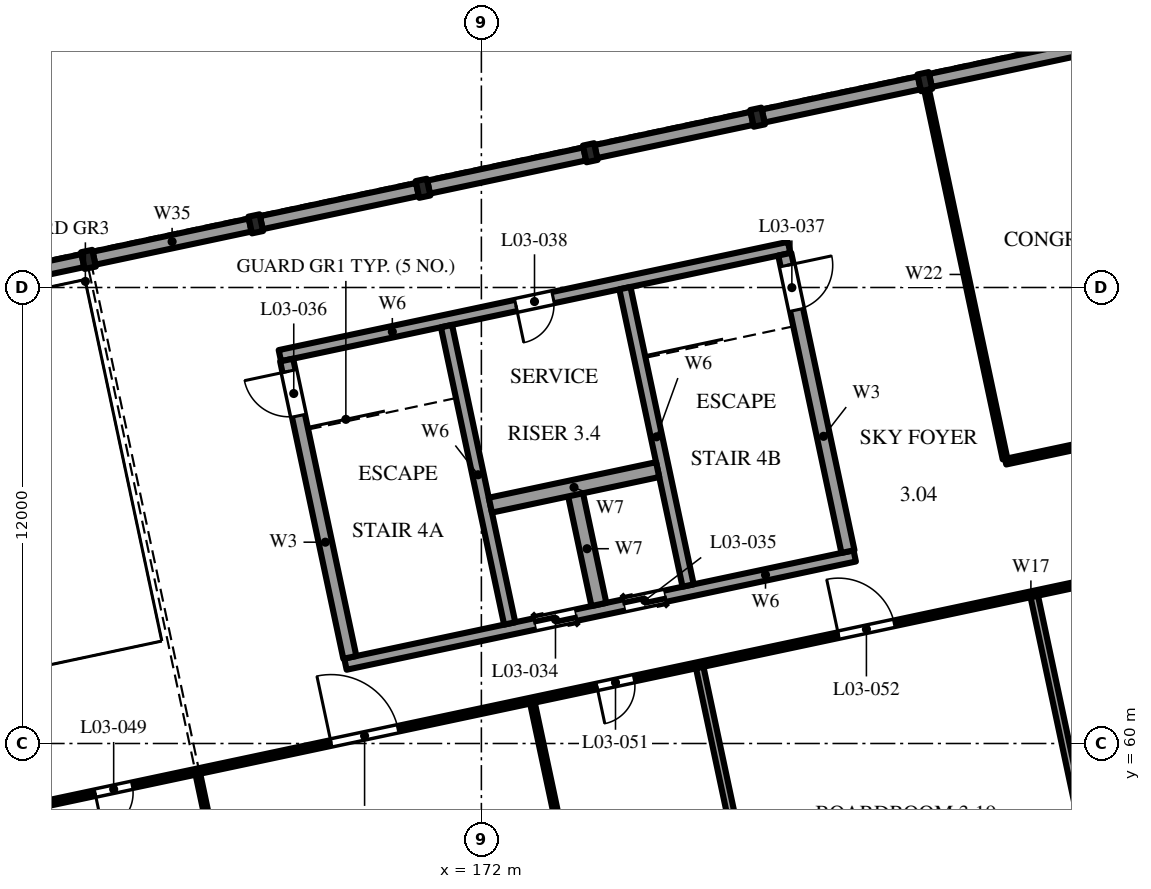
"""IFC4 building model, lengths in metres.
Left out: names, types, materials, properties, quantities, classifications, styles, units other than length and angle.
Written with IfcOpenShell. Run it as: python <this file> out.ifc"""

import sys

from ifc_helpers import new_model, si_unit, direction, frame, frame_2d, origin, origin_2d, place, context, subcontext, project, spatial, polyline, rectangle, i_section, outline, extrude, element, fill, save


model = new_model("IFC4")
c1 = context("Model", 3, precision=1e-05, world=origin(), true_north=direction((0.0, 1.0)))
c2 = subcontext(c1, "Body", "Model", "MODEL_VIEW")
j1 = project(units=[si_unit("LENGTHUNIT", "METRE"), si_unit("PLANEANGLEUNIT", "RADIAN")], contexts=[c1])
p1 = place(None, origin())
s1 = spatial("IfcSite", under=j1, at=p1, CompositionType="ELEMENT")
p2 = place(p1, origin())
s2 = spatial("IfcBuilding", under=s1, at=p2, CompositionType="ELEMENT")
p3 = place(p2, frame((0.0, 0.0, 16.8)))
s3 = spatial("IfcBuildingStorey", under=s2, at=p3, CompositionType="ELEMENT", Elevation=16.8)
for number, where, z_axis, x_axis in (
    (1, (161.661, 72.739, 0.0), (0.0, 0.0, 1.0), (0.978, 0.208, 0.0)),
    (2, (166.063, 73.675, 0.0), (0.0, 0.0, 1.0), (0.978, 0.208, 0.0)),
    (3, (170.464, 74.61, 0.0), (0.0, 0.0, 1.0), (0.978, 0.208, 0.0)),
    (4, (174.866, 75.546, 0.0), (0.0, 0.0, 1.0), (0.978, 0.208, 0.0)),
    (5, (179.268, 76.482, 0.0), (0.0, 0.0, 1.0), (0.978, 0.208, 0.0)),
    (6, (183.669, 77.417, 0.0), (0.0, 0.0, 1.0), (0.978, 0.208, 0.0)),
):
    element("IfcColumn", number, at=place(p3, frame(where, z_axis=z_axis, x_axis=x_axis)), inside=s3, PredefinedType="COLUMN", context=c2, shape_type="SweptSolid", body=[
        extrude(i_section(OverallWidth=0.3, OverallDepth=0.45, WebThickness=0.014, FlangeThickness=0.026, FilletRadius=0.027, at=origin_2d()), origin(), (0.0, 0.0, 1.0), 4.8),
    ])
p4 = place(p3, frame((166.698, 70.206, 0.0), z_axis=(0.0, 0.0, 1.0), x_axis=(0.978147662755, 0.20791139903, 0.0)))
e7 = element("IfcWall", 7, at=p4, inside=s3, PredefinedType="SHEAR", context=c2, shape_type="SweptSolid", body=[
    extrude(outline(polyline([(0.0, 0.0), (13.7, 0.0), (13.7, 12.494), (0.0, 11.761), (0.0, 0.0)])), frame((0.0, 0.15, 0.0), z_axis=(0.0, -1.0, 0.0), x_axis=(1.0, 0.0, 0.0)), (0.0, 0.0, 1.0), 0.3),
])
p5 = place(p4, frame((6.35, 0.0, 0.0)))
e8 = element("IfcOpeningElement", 8, at=p5, cuts=e7, PredefinedType="OPENING", context=c2, shape_type="SweptSolid", body=[
    extrude(rectangle(XDim=1.0, YDim=2.1, at=frame_2d((0.5, 1.05))), frame((0.0, 0.16, 0.0), z_axis=(0.0, -1.0, 0.0), x_axis=(1.0, 0.0, 0.0)), (0.0, 0.0, 1.0), 0.32),
])
p6 = place(p3, frame((168.423, 62.087, 0.0), z_axis=(0.0, 0.0, 1.0), x_axis=(0.978147662755, 0.20791139903, 0.0)))
e9 = element("IfcWall", 9, at=p6, inside=s3, PredefinedType="SHEAR", context=c2, shape_type="SweptSolid", body=[
    extrude(outline(polyline([(0.0, 0.0), (13.7, 0.0), (13.7, 12.929), (0.0, 12.196), (0.0, 0.0)])), frame((0.0, 0.15, 0.0), z_axis=(0.0, -1.0, 0.0), x_axis=(1.0, 0.0, 0.0)), (0.0, 0.0, 1.0), 0.3),
])
p7 = place(p6, frame((5.1, 0.0, 0.0)))
e10 = element("IfcOpeningElement", 10, at=p7, cuts=e9, PredefinedType="OPENING", context=c2, shape_type="SweptSolid", body=[
    extrude(rectangle(XDim=1.1, YDim=2.1, at=frame_2d((0.55, 1.05))), frame((0.0, 0.16, 0.0), z_axis=(0.0, -1.0, 0.0), x_axis=(1.0, 0.0, 0.0)), (0.0, 0.0, 1.0), 0.32),
])
p8 = place(p6, frame((7.5, 0.0, 0.0)))
e11 = element("IfcOpeningElement", 11, at=p8, cuts=e9, PredefinedType="OPENING", context=c2, shape_type="SweptSolid", body=[
    extrude(rectangle(XDim=1.1, YDim=2.1, at=frame_2d((0.55, 1.05))), frame((0.0, 0.16, 0.0), z_axis=(0.0, -1.0, 0.0), x_axis=(1.0, 0.0, 0.0)), (0.0, 0.0, 1.0), 0.32),
])
p9 = place(p3, frame((166.876, 70.091, 0.0), z_axis=(0.0, 0.0, 1.0), x_axis=(0.207915693476, -0.978146749934, 0.0)))
e12 = element("IfcWall", 12, at=p9, inside=s3, PredefinedType="SOLIDWALL", context=c2, shape_type="SweptSolid", body=[
    extrude(outline(polyline([(0.0, 0.0), (8.0, 0.0), (8.0, 12.196), (0.0, 11.777), (0.0, 0.0)])), frame((0.0, 0.175, 0.0), z_axis=(0.0, -1.0, 0.0), x_axis=(1.0, 0.0, 0.0)), (0.0, 0.0, 1.0), 0.35),
])
p10 = place(p9, frame((0.3, 0.0, 0.0)))
e13 = element("IfcOpeningElement", 13, at=p10, cuts=e12, PredefinedType="OPENING", context=c2, shape_type="SweptSolid", body=[
    extrude(rectangle(XDim=1.2, YDim=2.1, at=frame_2d((0.6, 1.05))), frame((0.0, 0.185, 0.0), z_axis=(0.0, -1.0, 0.0), x_axis=(1.0, 0.0, 0.0)), (0.0, 0.0, 1.0), 0.37),
])
p11 = place(p3, frame((179.983, 72.876, 0.0), z_axis=(0.0, 0.0, 1.0), x_axis=(0.207915693476, -0.978146749934, 0.0)))
e14 = element("IfcWall", 14, at=p11, inside=s3, PredefinedType="SOLIDWALL", context=c2, shape_type="SweptSolid", body=[
    extrude(outline(polyline([(0.0, 0.0), (8.0, 0.0), (8.0, 12.913), (0.0, 12.494), (0.0, 0.0)])), frame((0.0, 0.175, 0.0), z_axis=(0.0, -1.0, 0.0), x_axis=(1.0, 0.0, 0.0)), (0.0, 0.0, 1.0), 0.35),
])
p12 = place(p11, frame((0.3, 0.0, 0.0)))
e15 = element("IfcOpeningElement", 15, at=p12, cuts=e14, PredefinedType="OPENING", context=c2, shape_type="SweptSolid", body=[
    extrude(rectangle(XDim=1.2, YDim=2.1, at=frame_2d((0.6, 1.05))), frame((0.0, 0.185, 0.0), z_axis=(0.0, -1.0, 0.0), x_axis=(1.0, 0.0, 0.0)), (0.0, 0.0, 1.0), 0.37),
])
p13 = place(p3, frame((171.082, 70.985, 0.0), z_axis=(0.0, 0.0, 1.0), x_axis=(0.207915693476, -0.978146749934, 0.0)))
e16 = element("IfcWall", 16, at=p13, inside=s3, PredefinedType="SHEAR", context=c2, shape_type="SweptSolid", body=[
    extrude(outline(polyline([(0.0, 0.0), (8.0, 0.0), (8.0, 12.426), (0.0, 12.007), (0.0, 0.0)])), frame((0.0, 0.15, 0.0), z_axis=(0.0, -1.0, 0.0), x_axis=(1.0, 0.0, 0.0)), (0.0, 0.0, 1.0), 0.3),
])
p14 = place(p3, frame((175.777, 71.983, 0.0), z_axis=(0.0, 0.0, 1.0), x_axis=(0.207915693476, -0.978146749934, 0.0)))
e17 = element("IfcWall", 17, at=p14, inside=s3, PredefinedType="SHEAR", context=c2, shape_type="SweptSolid", body=[
    extrude(outline(polyline([(0.0, 0.0), (8.0, 0.0), (8.0, 12.683), (0.0, 12.264), (0.0, 0.0)])), frame((0.0, 0.15, 0.0), z_axis=(0.0, -1.0, 0.0), x_axis=(1.0, 0.0, 0.0)), (0.0, 0.0, 1.0), 0.3),
])
p15 = place(p3, frame((174.469, 66.593, 0.0), z_axis=(0.0, 0.0, 1.0), x_axis=(0.207933702079, -0.978142921837, 0.0)))
e18 = element("IfcWall", 18, at=p15, inside=s3, PredefinedType="SHEAR", context=c2, shape_type="SweptSolid", body=[
    extrude(outline(polyline([(0.0, 0.0), (3.0, 0.0), (3.0, 12.554), (0.0, 12.397), (0.0, 0.0)])), frame((0.0, 0.2, 0.0), z_axis=(0.0, -1.0, 0.0), x_axis=(1.0, 0.0, 0.0)), (0.0, 0.0, 1.0), 0.4),
])
p16 = place(p3, frame((172.237, 66.272, 0.0), z_axis=(0.0, 0.0, 1.0), x_axis=(0.978149611564, 0.20790223038, 0.0)))
e19 = element("IfcWall", 19, at=p16, inside=s3, PredefinedType="SHEAR", context=c2, shape_type="SweptSolid", body=[
    extrude(outline(polyline([(0.0, 0.0), (4.5, 0.0), (4.5, 12.51), (0.0, 12.269), (0.0, 0.0)])), frame((0.0, 0.2, 0.0), z_axis=(0.0, -1.0, 0.0), x_axis=(1.0, 0.0, 0.0)), (0.0, 0.0, 1.0), 0.4),
])
p17 = place(p3, frame((157.406, 71.835, 0.0), z_axis=(0.0, 0.0, 1.0), x_axis=(0.978146440129, 0.207917150959, 0.0)))
e20 = element("IfcWall", 20, at=p17, inside=s3, PredefinedType="SOLIDWALL", context=c2, shape_type="SweptSolid", body=[
    extrude(outline(polyline([(0.0, 0.0), (4.2, 0.0), (4.2, 12.633), (0.0, 12.408), (0.0, 0.0)])), frame((0.0, 0.175, 0.0), z_axis=(0.0, -1.0, 0.0), x_axis=(1.0, 0.0, 0.0)), (0.0, 0.0, 1.0), 0.35),
])
p18 = place(p3, frame((161.808, 72.771, 0.0), z_axis=(0.0, 0.0, 1.0), x_axis=(0.978155748334, 0.207873355681, 0.0)))
e21 = element("IfcWall", 21, at=p18, inside=s3, PredefinedType="SOLIDWALL", context=c2, shape_type="SweptSolid", body=[
    extrude(outline(polyline([(0.0, 0.0), (4.2, 0.0), (4.2, 12.874), (0.0, 12.649), (0.0, 0.0)])), frame((0.0, 0.175, 0.0), z_axis=(0.0, -1.0, 0.0), x_axis=(1.0, 0.0, 0.0)), (0.0, 0.0, 1.0), 0.35),
])
p19 = place(p3, frame((166.209, 73.706, 0.0), z_axis=(0.0, 0.0, 1.0), x_axis=(0.978143927149, 0.207928972925, 0.0)))
e22 = element("IfcWall", 22, at=p19, inside=s3, PredefinedType="SOLIDWALL", context=c2, shape_type="SweptSolid", body=[
    extrude(outline(polyline([(0.0, 0.0), (4.2, 0.0), (4.2, 13.114), (0.0, 12.889), (0.0, 0.0)])), frame((0.0, 0.175, 0.0), z_axis=(0.0, -1.0, 0.0), x_axis=(1.0, 0.0, 0.0)), (0.0, 0.0, 1.0), 0.35),
])
p20 = place(p3, frame((170.611, 74.642, 0.0), z_axis=(0.0, 0.0, 1.0), x_axis=(0.978143927149, 0.207928972925, 0.0)))
e23 = element("IfcWall", 23, at=p20, inside=s3, PredefinedType="SOLIDWALL", context=c2, shape_type="SweptSolid", body=[
    extrude(outline(polyline([(0.0, 0.0), (4.2, 0.0), (4.2, 13.355), (0.0, 13.13), (0.0, 0.0)])), frame((0.0, 0.175, 0.0), z_axis=(0.0, -1.0, 0.0), x_axis=(1.0, 0.0, 0.0)), (0.0, 0.0, 1.0), 0.35),
])
p21 = place(p3, frame((175.013, 75.577, 0.0), z_axis=(0.0, 0.0, 1.0), x_axis=(0.978146440129, 0.207917150959, 0.0)))
e24 = element("IfcWall", 24, at=p21, inside=s3, PredefinedType="SOLIDWALL", context=c2, shape_type="SweptSolid", body=[
    extrude(outline(polyline([(0.0, 0.0), (4.2, 0.0), (4.2, 13.596), (0.0, 13.371), (0.0, 0.0)])), frame((0.0, 0.175, 0.0), z_axis=(0.0, -1.0, 0.0), x_axis=(1.0, 0.0, 0.0)), (0.0, 0.0, 1.0), 0.35),
])
p22 = place(p3, frame((179.415, 76.513, 0.0), z_axis=(0.0, 0.0, 1.0), x_axis=(0.978155748334, 0.207873355681, 0.0)))
e25 = element("IfcWall", 25, at=p22, inside=s3, PredefinedType="SOLIDWALL", context=c2, shape_type="SweptSolid", body=[
    extrude(outline(polyline([(0.0, 0.0), (4.2, 0.0), (4.2, 13.836), (0.0, 13.612), (0.0, 0.0)])), frame((0.0, 0.175, 0.0), z_axis=(0.0, -1.0, 0.0), x_axis=(1.0, 0.0, 0.0)), (0.0, 0.0, 1.0), 0.35),
])
p23 = place(p3, frame((183.816, 77.448, 0.0), z_axis=(0.0, 0.0, 1.0), x_axis=(0.978143927149, 0.207928972925, 0.0)))
e26 = element("IfcWall", 26, at=p23, inside=s3, PredefinedType="SOLIDWALL", context=c2, shape_type="SweptSolid", body=[
    extrude(outline(polyline([(0.0, 0.0), (4.2, 0.0), (4.2, 14.077), (0.0, 13.853), (0.0, 0.0)])), frame((0.0, 0.175, 0.0), z_axis=(0.0, -1.0, 0.0), x_axis=(1.0, 0.0, 0.0)), (0.0, 0.0, 1.0), 0.35),
])
p24 = place(p3, frame((151.32, 56.458, 0.0), z_axis=(0.0, 0.0, 1.0), x_axis=(0.97814787394, 0.207910405482, 0.0)))
e27 = element("IfcWall", 27, at=p24, inside=s3, PredefinedType="PARTITIONING", context=c2, shape_type="SweptSolid", body=[
    extrude(outline(polyline([(0.0, 0.0), (45.0, 0.0), (45.0, 12.948), (0.0, 10.54), (0.0, 0.0)])), frame((0.0, 0.075, 0.0), z_axis=(0.0, -1.0, 0.0), x_axis=(1.0, 0.0, 0.0)), (0.0, 0.0, 1.0), 0.15),
])
p25 = place(p24, frame((3.6, 0.0, 0.0)))
e28 = element("IfcOpeningElement", 28, at=p25, cuts=e27, PredefinedType="OPENING", context=c2, shape_type="SweptSolid", body=[
    extrude(rectangle(XDim=1.8, YDim=2.1, at=frame_2d((0.9, 1.05))), frame((0.0, 0.085, 0.0), z_axis=(0.0, -1.0, 0.0), x_axis=(1.0, 0.0, 0.0)), (0.0, 0.0, 1.0), 0.17),
])
p26 = place(p24, frame((10.75, 0.0, 0.0)))
e29 = element("IfcOpeningElement", 29, at=p26, cuts=e27, PredefinedType="OPENING", context=c2, shape_type="SweptSolid", body=[
    extrude(rectangle(XDim=1.0, YDim=2.1, at=frame_2d((0.5, 1.05))), frame((0.0, 0.085, 0.0), z_axis=(0.0, -1.0, 0.0), x_axis=(1.0, 0.0, 0.0)), (0.0, 0.0, 1.0), 0.17),
])
p27 = place(p24, frame((17.1, 0.0, 0.0)))
e30 = element("IfcOpeningElement", 30, at=p27, cuts=e27, PredefinedType="OPENING", context=c2, shape_type="SweptSolid", body=[
    extrude(rectangle(XDim=1.8, YDim=2.1, at=frame_2d((0.9, 1.05))), frame((0.0, 0.085, 0.0), z_axis=(0.0, -1.0, 0.0), x_axis=(1.0, 0.0, 0.0)), (0.0, 0.0, 1.0), 0.17),
])
p28 = place(p24, frame((24.25, 0.0, 0.0)))
e31 = element("IfcOpeningElement", 31, at=p28, cuts=e27, PredefinedType="OPENING", context=c2, shape_type="SweptSolid", body=[
    extrude(rectangle(XDim=1.0, YDim=2.1, at=frame_2d((0.5, 1.05))), frame((0.0, 0.085, 0.0), z_axis=(0.0, -1.0, 0.0), x_axis=(1.0, 0.0, 0.0)), (0.0, 0.0, 1.0), 0.17),
])
p29 = place(p24, frame((30.75, 0.0, 0.0)))
e32 = element("IfcOpeningElement", 32, at=p29, cuts=e27, PredefinedType="OPENING", context=c2, shape_type="SweptSolid", body=[
    extrude(rectangle(XDim=1.5, YDim=2.1, at=frame_2d((0.75, 1.05))), frame((0.0, 0.085, 0.0), z_axis=(0.0, -1.0, 0.0), x_axis=(1.0, 0.0, 0.0)), (0.0, 0.0, 1.0), 0.17),
])
p30 = place(p24, frame((39.6, 0.0, 0.0)))
e33 = element("IfcOpeningElement", 33, at=p30, cuts=e27, PredefinedType="OPENING", context=c2, shape_type="SweptSolid", body=[
    extrude(rectangle(XDim=1.8, YDim=2.1, at=frame_2d((0.9, 1.05))), frame((0.0, 0.085, 0.0), z_axis=(0.0, -1.0, 0.0), x_axis=(1.0, 0.0, 0.0)), (0.0, 0.0, 1.0), 0.17),
])
p31 = place(p3, frame((162.202, 48.548, 0.0), z_axis=(0.0, 0.0, 1.0), x_axis=(-0.207904355568, 0.978149159861, 0.0)))
e34 = element("IfcWall", 34, at=p31, inside=s3, PredefinedType="PARTITIONING", context=c2, shape_type="SweptSolid", body=[
    extrude(outline(polyline([(0.0, 0.0), (9.925, 0.0), (9.925, 10.307), (0.0, 10.307), (0.0, 0.0)])), frame((0.0, 0.062, 0.0), z_axis=(0.0, -1.0, 0.0), x_axis=(1.0, 0.0, 0.0)), (0.0, 0.0, 1.0), 0.125),
])
p32 = place(p3, frame((166.604, 49.484, 0.0), z_axis=(0.0, 0.0, 1.0), x_axis=(-0.207932893358, 0.978143093754, 0.0)))
e35 = element("IfcWall", 35, at=p32, inside=s3, PredefinedType="PARTITIONING", context=c2, shape_type="SweptSolid", body=[
    extrude(outline(polyline([(0.0, 0.0), (9.925, 0.0), (9.925, 10.548), (0.0, 10.548), (0.0, 0.0)])), frame((0.0, 0.062, 0.0), z_axis=(0.0, -1.0, 0.0), x_axis=(1.0, 0.0, 0.0)), (0.0, 0.0, 1.0), 0.125),
])
p33 = place(p3, frame((175.407, 51.355, 0.0), z_axis=(0.0, 0.0, 1.0), x_axis=(-0.20790935802, 0.978148096582, 0.0)))
e36 = element("IfcWall", 36, at=p33, inside=s3, PredefinedType="PARTITIONING", context=c2, shape_type="SweptSolid", body=[
    extrude(outline(polyline([(0.0, 0.0), (9.925, 0.0), (9.925, 11.748), (0.0, 11.949), (0.0, 0.0)])), frame((0.0, 0.062, 0.0), z_axis=(0.0, -1.0, 0.0), x_axis=(1.0, 0.0, 0.0)), (0.0, 0.0, 1.0), 0.125),
])
p34 = place(p3, frame((179.809, 52.291, 0.0), z_axis=(0.0, 0.0, 1.0), x_axis=(-0.207904355568, 0.978149159861, 0.0)))
e37 = element("IfcWall", 37, at=p34, inside=s3, PredefinedType="PARTITIONING", context=c2, shape_type="SweptSolid", body=[
    extrude(outline(polyline([(0.0, 0.0), (9.925, 0.0), (9.925, 11.989), (0.0, 12.19), (0.0, 0.0)])), frame((0.0, 0.1, 0.0), z_axis=(0.0, -1.0, 0.0), x_axis=(1.0, 0.0, 0.0)), (0.0, 0.0, 1.0), 0.2),
])
p35 = place(p3, frame((188.613, 54.162, 0.0), z_axis=(0.0, 0.0, 1.0), x_axis=(-0.207932893358, 0.978143093754, 0.0)))
e38 = element("IfcWall", 38, at=p35, inside=s3, PredefinedType="PARTITIONING", context=c2, shape_type="SweptSolid", body=[
    extrude(outline(polyline([(0.0, 0.0), (9.925, 0.0), (9.925, 11.751), (0.0, 11.751), (0.0, 0.0)])), frame((0.0, 0.1, 0.0), z_axis=(0.0, -1.0, 0.0), x_axis=(1.0, 0.0, 0.0)), (0.0, 0.0, 1.0), 0.2),
])
p36 = place(p3, frame((185.795, 67.416, 0.0), z_axis=(0.0, 0.0, 1.0), x_axis=(0.978148801969, 0.20790603937, 0.0)))
e39 = element("IfcWall", 39, at=p36, inside=s3, PredefinedType="PARTITIONING", context=c2, shape_type="SweptSolid", body=[
    extrude(outline(polyline([(0.0, 0.0), (29.95, 0.0), (29.95, 13.883), (0.0, 12.28), (0.0, 0.0)])), frame((0.0, 0.075, 0.0), z_axis=(0.0, -1.0, 0.0), x_axis=(1.0, 0.0, 0.0)), (0.0, 0.0, 1.0), 0.15),
])
p37 = place(p36, frame((3.6, 0.0, 0.0)))
e40 = element("IfcOpeningElement", 40, at=p37, cuts=e39, PredefinedType="OPENING", context=c2, shape_type="SweptSolid", body=[
    extrude(rectangle(XDim=1.8, YDim=2.1, at=frame_2d((0.9, 1.05))), frame((0.0, 0.085, 0.0), z_axis=(0.0, -1.0, 0.0), x_axis=(1.0, 0.0, 0.0)), (0.0, 0.0, 1.0), 0.17),
])
p38 = place(p36, frame((14.85, 0.0, 0.0)))
e41 = element("IfcOpeningElement", 41, at=p38, cuts=e39, PredefinedType="OPENING", context=c2, shape_type="SweptSolid", body=[
    extrude(rectangle(XDim=1.8, YDim=2.1, at=frame_2d((0.9, 1.05))), frame((0.0, 0.085, 0.0), z_axis=(0.0, -1.0, 0.0), x_axis=(1.0, 0.0, 0.0)), (0.0, 0.0, 1.0), 0.17),
])
p39 = place(p36, frame((25.725, 0.0, 0.0)))
e42 = element("IfcOpeningElement", 42, at=p39, cuts=e39, PredefinedType="OPENING", context=c2, shape_type="SweptSolid", body=[
    extrude(rectangle(XDim=1.0, YDim=2.1, at=frame_2d((0.5, 1.05))), frame((0.0, 0.085, 0.0), z_axis=(0.0, -1.0, 0.0), x_axis=(1.0, 0.0, 0.0)), (0.0, 0.0, 1.0), 0.17),
])
p40 = place(p3, frame((183.716, 77.197, 0.0), z_axis=(0.0, 0.0, 1.0), x_axis=(0.207927890391, -0.978144157268, 0.0)))
e43 = element("IfcWall", 43, at=p40, inside=s3, PredefinedType="PARTITIONING", context=c2, shape_type="SweptSolid", body=[
    extrude(outline(polyline([(0.0, 0.0), (9.925, 0.0), (9.925, 11.751), (0.0, 11.751), (0.0, 0.0)])), frame((0.0, 0.062, 0.0), z_axis=(0.0, -1.0, 0.0), x_axis=(1.0, 0.0, 0.0)), (0.0, 0.0, 1.0), 0.125),
])
p41 = place(p7, frame((1.1, 0.0, 0.0), z_axis=(0.0, 0.0, 1.0), x_axis=(-1.0, 0.0, 0.0)))
e44 = element("IfcDoor", 44, at=p41, inside=s3, OperationType="DOUBLE_DOOR_SLIDING", PredefinedType="DOOR", context=c2, shape_type="SweptSolid", body=[
    extrude(rectangle(XDim=1.1, YDim=2.1, at=frame_2d((0.55, 1.05))), frame((0.0, 0.025, 0.0), z_axis=(0.0, -1.0, 0.0), x_axis=(1.0, 0.0, 0.0)), (0.0, 0.0, 1.0), 0.05),
])
fill(e10, e44)
p42 = place(p8, frame((1.1, 0.0, 0.0), z_axis=(0.0, 0.0, 1.0), x_axis=(-1.0, 0.0, 0.0)))
e45 = element("IfcDoor", 45, at=p42, inside=s3, OperationType="DOUBLE_DOOR_SLIDING", PredefinedType="DOOR", context=c2, shape_type="SweptSolid", body=[
    extrude(rectangle(XDim=1.1, YDim=2.1, at=frame_2d((0.55, 1.05))), frame((0.0, 0.025, 0.0), z_axis=(0.0, -1.0, 0.0), x_axis=(1.0, 0.0, 0.0)), (0.0, 0.0, 1.0), 0.05),
])
fill(e11, e45)
p43 = place(p10, frame((1.2, 0.0, 0.0), z_axis=(0.0, 0.0, 1.0), x_axis=(-1.0, 0.0, 0.0)))
e46 = element("IfcDoor", 46, at=p43, inside=s3, OperationType="SINGLE_SWING_RIGHT", PredefinedType="DOOR", context=c2, shape_type="SweptSolid", body=[
    extrude(rectangle(XDim=1.2, YDim=2.1, at=frame_2d((0.6, 1.05))), frame((0.0, 0.025, 0.0), z_axis=(0.0, -1.0, 0.0), x_axis=(1.0, 0.0, 0.0)), (0.0, 0.0, 1.0), 0.05),
])
fill(e13, e46)
p44 = place(p12, origin())
e47 = element("IfcDoor", 47, at=p44, inside=s3, OperationType="SINGLE_SWING_RIGHT", PredefinedType="DOOR", context=c2, shape_type="SweptSolid", body=[
    extrude(rectangle(XDim=1.2, YDim=2.1, at=frame_2d((0.6, 1.05))), frame((0.0, 0.025, 0.0), z_axis=(0.0, -1.0, 0.0), x_axis=(1.0, 0.0, 0.0)), (0.0, 0.0, 1.0), 0.05),
])
fill(e15, e47)
p45 = place(p5, frame((1.0, 0.0, 0.0), z_axis=(0.0, 0.0, 1.0), x_axis=(-1.0, 0.0, 0.0)))
e48 = element("IfcDoor", 48, at=p45, inside=s3, OperationType="SINGLE_SWING_LEFT", PredefinedType="DOOR", context=c2, shape_type="SweptSolid", body=[
    extrude(rectangle(XDim=1.0, YDim=2.1, at=frame_2d((0.5, 1.05))), frame((0.0, 0.025, 0.0), z_axis=(0.0, -1.0, 0.0), x_axis=(1.0, 0.0, 0.0)), (0.0, 0.0, 1.0), 0.05),
])
fill(e8, e48)
p46 = place(p26, frame((1.0, 0.0, 0.0), z_axis=(0.0, 0.0, 1.0), x_axis=(-1.0, 0.0, 0.0)))
e49 = element("IfcDoor", 49, at=p46, inside=s3, OperationType="SINGLE_SWING_LEFT", PredefinedType="DOOR", context=c2, shape_type="SweptSolid", body=[
    extrude(rectangle(XDim=1.0, YDim=2.1, at=frame_2d((0.5, 1.05))), frame((0.0, 0.025, 0.0), z_axis=(0.0, -1.0, 0.0), x_axis=(1.0, 0.0, 0.0)), (0.0, 0.0, 1.0), 0.05),
])
fill(e29, e49)
p47 = place(p27, origin())
e50 = element("IfcDoor", 50, at=p47, inside=s3, OperationType="DOUBLE_DOOR_SINGLE_SWING", PredefinedType="DOOR", context=c2, shape_type="SweptSolid", body=[
    extrude(rectangle(XDim=1.8, YDim=2.1, at=frame_2d((0.9, 1.05))), frame((0.0, 0.025, 0.0), z_axis=(0.0, -1.0, 0.0), x_axis=(1.0, 0.0, 0.0)), (0.0, 0.0, 1.0), 0.05),
])
fill(e30, e50)
p48 = place(p28, frame((1.0, 0.0, 0.0), z_axis=(0.0, 0.0, 1.0), x_axis=(-1.0, 0.0, 0.0)))
e51 = element("IfcDoor", 51, at=p48, inside=s3, OperationType="SINGLE_SWING_LEFT", PredefinedType="DOOR", context=c2, shape_type="SweptSolid", body=[
    extrude(rectangle(XDim=1.0, YDim=2.1, at=frame_2d((0.5, 1.05))), frame((0.0, 0.025, 0.0), z_axis=(0.0, -1.0, 0.0), x_axis=(1.0, 0.0, 0.0)), (0.0, 0.0, 1.0), 0.05),
])
fill(e31, e51)
p49 = place(p29, origin())
e52 = element("IfcDoor", 52, at=p49, inside=s3, OperationType="DOUBLE_DOOR_SINGLE_SWING", PredefinedType="DOOR", context=c2, shape_type="SweptSolid", body=[
    extrude(rectangle(XDim=1.5, YDim=2.1, at=frame_2d((0.75, 1.05))), frame((0.0, 0.025, 0.0), z_axis=(0.0, -1.0, 0.0), x_axis=(1.0, 0.0, 0.0)), (0.0, 0.0, 1.0), 0.05),
])
fill(e32, e52)
save(model, sys.argv[1])
